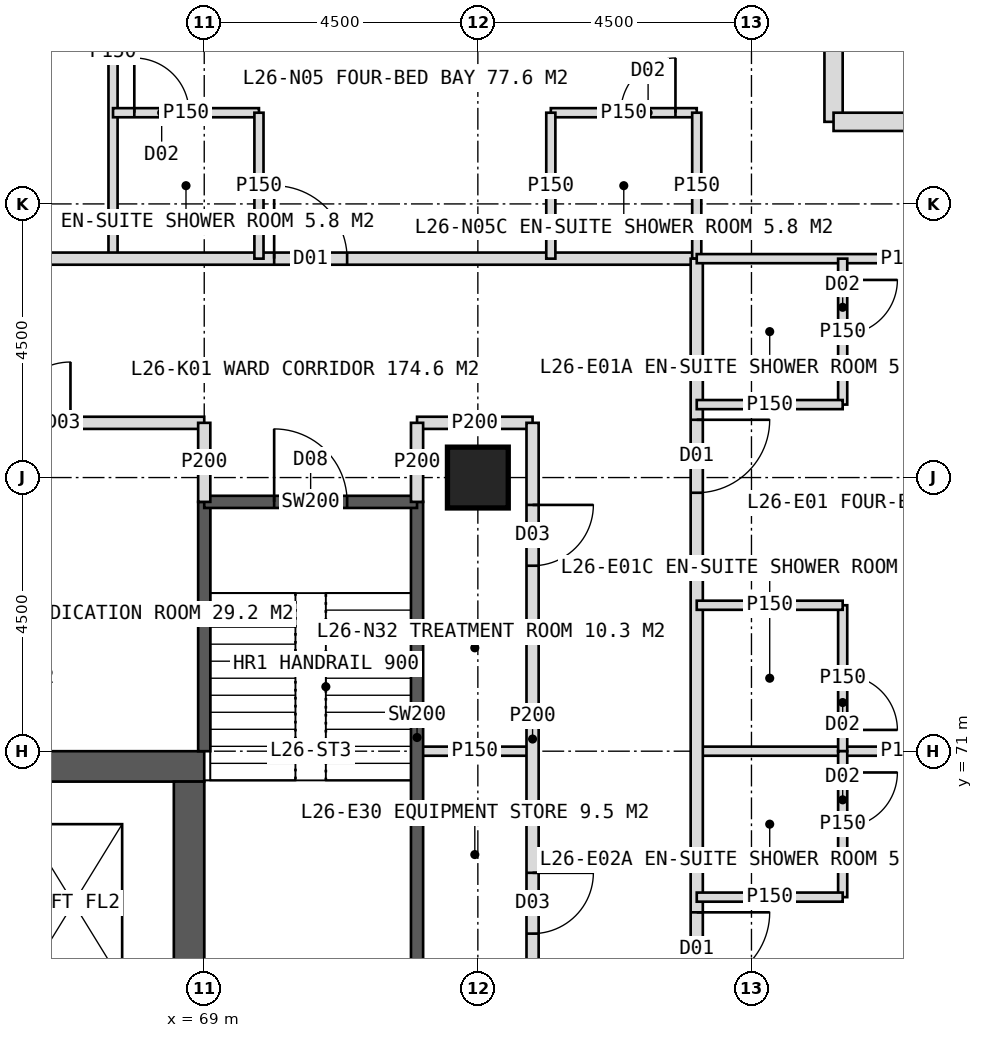
"""IFC4 building model, lengths in metres.
Left out: names, types, materials, properties, quantities, classifications, styles, units other than length and angle.
Written with IfcOpenShell. Run it as: python <this file> out.ifc"""

import sys

from ifc_helpers import new_model, si_unit, direction, frame, frame_2d, origin, origin_2d, place, context, subcontext, project, spatial, rectangle, hollow_rectangle, extrude, element, fill, save


model = new_model("IFC4")
c1 = context("Model", 3, precision=1e-05, world=origin(), true_north=direction((0.0, 1.0)))
c2 = subcontext(c1, "Body", "Model", "MODEL_VIEW")
j1 = project(units=[si_unit("LENGTHUNIT", "METRE"), si_unit("PLANEANGLEUNIT", "RADIAN")], contexts=[c1])
p1 = place(None, origin())
s1 = spatial("IfcSite", under=j1, at=p1, CompositionType="ELEMENT")
p2 = place(p1, origin())
s2 = spatial("IfcBuilding", under=s1, at=p2, CompositionType="ELEMENT")
p3 = place(p2, frame((0.0, 0.0, 112.0)))
s3 = spatial("IfcBuildingStorey", under=s2, at=p3, CompositionType="ELEMENT", Elevation=112.0)
p4 = place(p3, frame((51.0, 70.75, 0.0), z_axis=(0.0, 0.0, 1.0), x_axis=(1.0, 0.0, 0.0)))
e1 = element("IfcWall", 1, at=p4, inside=s3, PredefinedType="SHEAR", context=c2, shape_type="SweptSolid", body=[
    extrude(rectangle(XDim=18.0, YDim=0.5, at=frame_2d((9.0, 0.0))), origin(), (0.0, 0.0, 1.0), 4.0),
])
p5 = place(p4, frame((8.1, 0.0, 0.0)))
e2 = element("IfcOpeningElement", 2, at=p5, cuts=e1, PredefinedType="OPENING", context=c2, shape_type="SweptSolid", body=[
    extrude(rectangle(XDim=1.8, YDim=2.2, at=frame_2d((0.9, 1.1))), frame((0.0, 0.26, 0.0), z_axis=(0.0, -1.0, 0.0), x_axis=(1.0, 0.0, 0.0)), (0.0, 0.0, 1.0), 0.52),
])
p6 = place(p3, frame((68.75, 53.5, 0.0), z_axis=(0.0, 0.0, 1.0), x_axis=(0.0, 1.0, 0.0)))
e3 = element("IfcWall", 3, at=p6, inside=s3, PredefinedType="SHEAR", context=c2, shape_type="SweptSolid", body=[
    extrude(rectangle(XDim=17.0, YDim=0.5, at=frame_2d((8.5, 0.0))), origin(), (0.0, 0.0, 1.0), 4.0),
])
p7 = place(p6, frame((9.5, 0.0, 0.0)))
e4 = element("IfcOpeningElement", 4, at=p7, cuts=e3, PredefinedType="OPENING", context=c2, shape_type="SweptSolid", body=[
    extrude(rectangle(XDim=1.5, YDim=2.2, at=frame_2d((0.75, 1.1))), frame((0.0, 0.26, 0.0), z_axis=(0.0, -1.0, 0.0), x_axis=(1.0, 0.0, 0.0)), (0.0, 0.0, 1.0), 0.52),
])
p8 = place(p3, frame((73.5, 75.5, 0.0), z_axis=(0.0, 0.0, 1.0), x_axis=(1.0, 0.0, 0.0)))
e5 = element("IfcColumn", 5, at=p8, inside=s3, PredefinedType="COLUMN", context=c2, shape_type="SweptSolid", body=[
    extrude(hollow_rectangle(XDim=1.0, YDim=1.0, WallThickness=0.1, at=origin_2d()), origin(), (0.0, 0.0, 1.0), 4.0),
])
for number, where, z_axis, x_axis in (
    (6, (79.35, 85.15, 0.0), (0.0, 0.0, 1.0), (0.0, -1.0, 0.0)),
    (7, (79.35, 81.35, 0.0), (0.0, 0.0, 1.0), (1.0, 0.0, 0.0)),
):
    element("IfcWall", number, at=place(p3, frame(where, z_axis=z_axis, x_axis=x_axis)), inside=s3, PredefinedType="ELEMENTEDWALL", context=c2, shape_type="SweptSolid", body=[
        extrude(rectangle(XDim=3.8, YDim=0.3, at=frame_2d((1.9, 0.0))), origin(), (0.0, 0.0, 1.0), 4.0),
    ])
p9 = place(p3, frame((67.5, 79.1, 0.0), z_axis=(0.0, 0.0, 1.0), x_axis=(0.0, 1.0, 0.0)))
e8 = element("IfcWall", 8, at=p9, inside=s3, PredefinedType="PARTITIONING", context=c2, shape_type="SweptSolid", body=[
    extrude(rectangle(XDim=6.81, YDim=0.15, at=frame_2d((3.405, 0.0))), origin(), (0.0, 0.0, 1.0), 3.75),
])
p10 = place(p3, frame((42.9, 79.1, 0.0), z_axis=(0.0, 0.0, 1.0), x_axis=(1.0, 0.0, 0.0)))
e9 = element("IfcWall", 9, at=p10, inside=s3, PredefinedType="PARTITIONING", context=c2, shape_type="SweptSolid", body=[
    extrude(rectangle(XDim=34.2, YDim=0.2, at=frame_2d((17.1, 0.0))), origin(), (0.0, 0.0, 1.0), 3.75),
])
p11 = place(p10, frame((3.25, 0.0, 0.0)))
e10 = element("IfcOpeningElement", 10, at=p11, cuts=e9, PredefinedType="OPENING", context=c2, shape_type="SweptSolid", body=[
    extrude(rectangle(XDim=1.2, YDim=2.2, at=frame_2d((0.6, 1.1))), frame((0.0, 0.11, 0.0), z_axis=(0.0, -1.0, 0.0), x_axis=(1.0, 0.0, 0.0)), (0.0, 0.0, 1.0), 0.22),
])
p12 = place(p10, frame((9.25, 0.0, 0.0)))
e11 = element("IfcOpeningElement", 11, at=p12, cuts=e9, PredefinedType="OPENING", context=c2, shape_type="SweptSolid", body=[
    extrude(rectangle(XDim=1.2, YDim=2.2, at=frame_2d((0.6, 1.1))), frame((0.0, 0.11, 0.0), z_axis=(0.0, -1.0, 0.0), x_axis=(1.0, 0.0, 0.0)), (0.0, 0.0, 1.0), 0.22),
])
p13 = place(p10, frame((13.75, 0.0, 0.0)))
e12 = element("IfcOpeningElement", 12, at=p13, cuts=e9, PredefinedType="OPENING", context=c2, shape_type="SweptSolid", body=[
    extrude(rectangle(XDim=1.2, YDim=2.2, at=frame_2d((0.6, 1.1))), frame((0.0, 0.11, 0.0), z_axis=(0.0, -1.0, 0.0), x_axis=(1.0, 0.0, 0.0)), (0.0, 0.0, 1.0), 0.22),
])
p14 = place(p10, frame((19.6, 0.0, 0.0)))
e13 = element("IfcOpeningElement", 13, at=p14, cuts=e9, PredefinedType="OPENING", context=c2, shape_type="SweptSolid", body=[
    extrude(rectangle(XDim=1.0, YDim=2.1, at=frame_2d((0.5, 1.05))), frame((0.0, 0.11, 0.0), z_axis=(0.0, -1.0, 0.0), x_axis=(1.0, 0.0, 0.0)), (0.0, 0.0, 1.0), 0.22),
])
p15 = place(p10, frame((27.25, 0.0, 0.0)))
e14 = element("IfcOpeningElement", 14, at=p15, cuts=e9, PredefinedType="OPENING", context=c2, shape_type="SweptSolid", body=[
    extrude(rectangle(XDim=1.2, YDim=2.2, at=frame_2d((0.6, 1.1))), frame((0.0, 0.11, 0.0), z_axis=(0.0, -1.0, 0.0), x_axis=(1.0, 0.0, 0.0)), (0.0, 0.0, 1.0), 0.22),
])
p16 = place(p3, frame((67.5, 81.5, 0.0), z_axis=(0.0, 0.0, 1.0), x_axis=(1.0, 0.0, 0.0)))
e15 = element("IfcWall", 15, at=p16, inside=s3, PredefinedType="PARTITIONING", context=c2, shape_type="SweptSolid", body=[
    extrude(rectangle(XDim=2.4, YDim=0.15, at=frame_2d((1.2, 0.0))), origin(), (0.0, 0.0, 1.0), 3.75),
])
p17 = place(p16, frame((0.35, 0.0, 0.0)))
e16 = element("IfcOpeningElement", 16, at=p17, cuts=e15, PredefinedType="OPENING", context=c2, shape_type="SweptSolid", body=[
    extrude(rectangle(XDim=0.9, YDim=2.1, at=frame_2d((0.45, 1.05))), frame((0.0, 0.085, 0.0), z_axis=(0.0, -1.0, 0.0), x_axis=(1.0, 0.0, 0.0)), (0.0, 0.0, 1.0), 0.17),
])
p18 = place(p3, frame((69.9, 79.1, 0.0), z_axis=(0.0, 0.0, 1.0), x_axis=(0.0, 1.0, 0.0)))
e17 = element("IfcWall", 17, at=p18, inside=s3, PredefinedType="PARTITIONING", context=c2, shape_type="SweptSolid", body=[
    extrude(rectangle(XDim=2.4, YDim=0.15, at=frame_2d((1.2, 0.0))), origin(), (0.0, 0.0, 1.0), 3.75),
])
p19 = place(p3, frame((74.7, 81.5, 0.0), z_axis=(0.0, 0.0, 1.0), x_axis=(1.0, 0.0, 0.0)))
e18 = element("IfcWall", 18, at=p19, inside=s3, PredefinedType="PARTITIONING", context=c2, shape_type="SweptSolid", body=[
    extrude(rectangle(XDim=2.4, YDim=0.15, at=frame_2d((1.2, 0.0))), origin(), (0.0, 0.0, 1.0), 3.75),
])
p20 = place(p19, frame((1.15, 0.0, 0.0)))
e19 = element("IfcOpeningElement", 19, at=p20, cuts=e18, PredefinedType="OPENING", context=c2, shape_type="SweptSolid", body=[
    extrude(rectangle(XDim=0.9, YDim=2.1, at=frame_2d((0.45, 1.05))), frame((0.0, 0.085, 0.0), z_axis=(0.0, -1.0, 0.0), x_axis=(1.0, 0.0, 0.0)), (0.0, 0.0, 1.0), 0.17),
])
for number, where, z_axis, x_axis in (
    (20, (74.7, 79.1, 0.0), (0.0, 0.0, 1.0), (0.0, 1.0, 0.0)),
    (21, (77.1, 79.1, 0.0), (0.0, 0.0, 1.0), (0.0, 1.0, 0.0)),
):
    element("IfcWall", number, at=place(p3, frame(where, z_axis=z_axis, x_axis=x_axis)), inside=s3, PredefinedType="PARTITIONING", context=c2, shape_type="SweptSolid", body=[
        extrude(rectangle(XDim=2.4, YDim=0.15, at=frame_2d((1.2, 0.0))), origin(), (0.0, 0.0, 1.0), 3.75),
    ])
p21 = place(p3, frame((62.25, 76.4, 0.0), z_axis=(0.0, 0.0, 1.0), x_axis=(1.0, 0.0, 0.0)))
e22 = element("IfcWall", 22, at=p21, inside=s3, PredefinedType="PARTITIONING", context=c2, shape_type="SweptSolid", body=[
    extrude(rectangle(XDim=6.75, YDim=0.2, at=frame_2d((3.375, 0.0))), origin(), (0.0, 0.0, 1.0), 3.75),
])
p22 = place(p21, frame((3.55, 0.0, 0.0)))
e23 = element("IfcOpeningElement", 23, at=p22, cuts=e22, PredefinedType="OPENING", context=c2, shape_type="SweptSolid", body=[
    extrude(rectangle(XDim=1.0, YDim=2.1, at=frame_2d((0.5, 1.05))), frame((0.0, 0.11, 0.0), z_axis=(0.0, -1.0, 0.0), x_axis=(1.0, 0.0, 0.0)), (0.0, 0.0, 1.0), 0.22),
])
p23 = place(p3, frame((72.5, 76.4, 0.0), z_axis=(0.0, 0.0, 1.0), x_axis=(1.0, 0.0, 0.0)))
e24 = element("IfcWall", 24, at=p23, inside=s3, PredefinedType="PARTITIONING", context=c2, shape_type="SweptSolid", body=[
    extrude(rectangle(XDim=1.9, YDim=0.2, at=frame_2d((0.95, 0.0))), origin(), (0.0, 0.0, 1.0), 3.75),
])
p24 = place(p3, frame((77.1, 71.0, 0.0), z_axis=(0.0, 0.0, 1.0), x_axis=(1.0, 0.0, 0.0)))
e25 = element("IfcWall", 25, at=p24, inside=s3, PredefinedType="PARTITIONING", context=c2, shape_type="SweptSolid", body=[
    extrude(rectangle(XDim=6.81, YDim=0.15, at=frame_2d((3.405, 0.0))), origin(), (0.0, 0.0, 1.0), 3.75),
])
p25 = place(p3, frame((77.1, 79.1, 0.0), z_axis=(0.0, 0.0, 1.0), x_axis=(0.0, -1.0, 0.0)))
e26 = element("IfcWall", 26, at=p25, inside=s3, PredefinedType="PARTITIONING", context=c2, shape_type="SweptSolid", body=[
    extrude(rectangle(XDim=34.2, YDim=0.2, at=frame_2d((17.1, 0.0))), origin(), (0.0, 0.0, 1.0), 3.75),
])
p26 = place(p25, frame((2.65, 0.0, 0.0)))
e27 = element("IfcOpeningElement", 27, at=p26, cuts=e26, PredefinedType="OPENING", context=c2, shape_type="SweptSolid", body=[
    extrude(rectangle(XDim=1.2, YDim=2.2, at=frame_2d((0.6, 1.1))), frame((0.0, 0.11, 0.0), z_axis=(0.0, -1.0, 0.0), x_axis=(1.0, 0.0, 0.0)), (0.0, 0.0, 1.0), 0.22),
])
p27 = place(p25, frame((10.75, 0.0, 0.0)))
e28 = element("IfcOpeningElement", 28, at=p27, cuts=e26, PredefinedType="OPENING", context=c2, shape_type="SweptSolid", body=[
    extrude(rectangle(XDim=1.2, YDim=2.2, at=frame_2d((0.6, 1.1))), frame((0.0, 0.11, 0.0), z_axis=(0.0, -1.0, 0.0), x_axis=(1.0, 0.0, 0.0)), (0.0, 0.0, 1.0), 0.22),
])
p28 = place(p25, frame((19.75, 0.0, 0.0)))
e29 = element("IfcOpeningElement", 29, at=p28, cuts=e26, PredefinedType="OPENING", context=c2, shape_type="SweptSolid", body=[
    extrude(rectangle(XDim=1.2, YDim=2.2, at=frame_2d((0.6, 1.1))), frame((0.0, 0.11, 0.0), z_axis=(0.0, -1.0, 0.0), x_axis=(1.0, 0.0, 0.0)), (0.0, 0.0, 1.0), 0.22),
])
p29 = place(p25, frame((25.75, 0.0, 0.0)))
e30 = element("IfcOpeningElement", 30, at=p29, cuts=e26, PredefinedType="OPENING", context=c2, shape_type="SweptSolid", body=[
    extrude(rectangle(XDim=1.2, YDim=2.2, at=frame_2d((0.6, 1.1))), frame((0.0, 0.11, 0.0), z_axis=(0.0, -1.0, 0.0), x_axis=(1.0, 0.0, 0.0)), (0.0, 0.0, 1.0), 0.22),
])
p30 = place(p25, frame((30.25, 0.0, 0.0)))
e31 = element("IfcOpeningElement", 31, at=p30, cuts=e26, PredefinedType="OPENING", context=c2, shape_type="SweptSolid", body=[
    extrude(rectangle(XDim=1.2, YDim=2.2, at=frame_2d((0.6, 1.1))), frame((0.0, 0.11, 0.0), z_axis=(0.0, -1.0, 0.0), x_axis=(1.0, 0.0, 0.0)), (0.0, 0.0, 1.0), 0.22),
])
p31 = place(p3, frame((77.1, 79.1, 0.0), z_axis=(0.0, 0.0, 1.0), x_axis=(1.0, 0.0, 0.0)))
e32 = element("IfcWall", 32, at=p31, inside=s3, PredefinedType="PARTITIONING", context=c2, shape_type="SweptSolid", body=[
    extrude(rectangle(XDim=6.81, YDim=0.15, at=frame_2d((3.405, 0.0))), origin(), (0.0, 0.0, 1.0), 3.75),
])
p32 = place(p3, frame((79.5, 79.1, 0.0), z_axis=(0.0, 0.0, 1.0), x_axis=(0.0, -1.0, 0.0)))
e33 = element("IfcWall", 33, at=p32, inside=s3, PredefinedType="PARTITIONING", context=c2, shape_type="SweptSolid", body=[
    extrude(rectangle(XDim=2.4, YDim=0.15, at=frame_2d((1.2, 0.0))), origin(), (0.0, 0.0, 1.0), 3.75),
])
p33 = place(p32, frame((0.35, 0.0, 0.0)))
e34 = element("IfcOpeningElement", 34, at=p33, cuts=e33, PredefinedType="OPENING", context=c2, shape_type="SweptSolid", body=[
    extrude(rectangle(XDim=0.9, YDim=2.1, at=frame_2d((0.45, 1.05))), frame((0.0, 0.085, 0.0), z_axis=(0.0, -1.0, 0.0), x_axis=(1.0, 0.0, 0.0)), (0.0, 0.0, 1.0), 0.17),
])
p34 = place(p3, frame((77.1, 76.7, 0.0), z_axis=(0.0, 0.0, 1.0), x_axis=(1.0, 0.0, 0.0)))
e35 = element("IfcWall", 35, at=p34, inside=s3, PredefinedType="PARTITIONING", context=c2, shape_type="SweptSolid", body=[
    extrude(rectangle(XDim=2.4, YDim=0.15, at=frame_2d((1.2, 0.0))), origin(), (0.0, 0.0, 1.0), 3.75),
])
p35 = place(p3, frame((79.5, 73.4, 0.0), z_axis=(0.0, 0.0, 1.0), x_axis=(0.0, -1.0, 0.0)))
e36 = element("IfcWall", 36, at=p35, inside=s3, PredefinedType="PARTITIONING", context=c2, shape_type="SweptSolid", body=[
    extrude(rectangle(XDim=2.4, YDim=0.15, at=frame_2d((1.2, 0.0))), origin(), (0.0, 0.0, 1.0), 3.75),
])
p36 = place(p35, frame((1.15, 0.0, 0.0)))
e37 = element("IfcOpeningElement", 37, at=p36, cuts=e36, PredefinedType="OPENING", context=c2, shape_type="SweptSolid", body=[
    extrude(rectangle(XDim=0.9, YDim=2.1, at=frame_2d((0.45, 1.05))), frame((0.0, 0.085, 0.0), z_axis=(0.0, -1.0, 0.0), x_axis=(1.0, 0.0, 0.0)), (0.0, 0.0, 1.0), 0.17),
])
p37 = place(p3, frame((77.1, 73.4, 0.0), z_axis=(0.0, 0.0, 1.0), x_axis=(1.0, 0.0, 0.0)))
e38 = element("IfcWall", 38, at=p37, inside=s3, PredefinedType="PARTITIONING", context=c2, shape_type="SweptSolid", body=[
    extrude(rectangle(XDim=2.4, YDim=0.15, at=frame_2d((1.2, 0.0))), origin(), (0.0, 0.0, 1.0), 3.75),
])
p38 = place(p3, frame((79.5, 71.0, 0.0), z_axis=(0.0, 0.0, 1.0), x_axis=(0.0, -1.0, 0.0)))
e39 = element("IfcWall", 39, at=p38, inside=s3, PredefinedType="PARTITIONING", context=c2, shape_type="SweptSolid", body=[
    extrude(rectangle(XDim=2.4, YDim=0.15, at=frame_2d((1.2, 0.0))), origin(), (0.0, 0.0, 1.0), 3.75),
])
p39 = place(p38, frame((0.35, 0.0, 0.0)))
e40 = element("IfcOpeningElement", 40, at=p39, cuts=e39, PredefinedType="OPENING", context=c2, shape_type="SweptSolid", body=[
    extrude(rectangle(XDim=0.9, YDim=2.1, at=frame_2d((0.45, 1.05))), frame((0.0, 0.085, 0.0), z_axis=(0.0, -1.0, 0.0), x_axis=(1.0, 0.0, 0.0)), (0.0, 0.0, 1.0), 0.17),
])
p40 = place(p3, frame((77.1, 68.6, 0.0), z_axis=(0.0, 0.0, 1.0), x_axis=(1.0, 0.0, 0.0)))
e41 = element("IfcWall", 41, at=p40, inside=s3, PredefinedType="PARTITIONING", context=c2, shape_type="SweptSolid", body=[
    extrude(rectangle(XDim=2.4, YDim=0.15, at=frame_2d((1.2, 0.0))), origin(), (0.0, 0.0, 1.0), 3.75),
])
p41 = place(p3, frame((72.5, 71.0, 0.0), z_axis=(0.0, 0.0, 1.0), x_axis=(1.0, 0.0, 0.0)))
e42 = element("IfcWall", 42, at=p41, inside=s3, PredefinedType="PARTITIONING", context=c2, shape_type="SweptSolid", body=[
    extrude(rectangle(XDim=1.9, YDim=0.15, at=frame_2d((0.95, 0.0))), origin(), (0.0, 0.0, 1.0), 3.75),
])
p42 = place(p3, frame((74.4, 76.4, 0.0), z_axis=(0.0, 0.0, 1.0), x_axis=(0.0, -1.0, 0.0)))
e43 = element("IfcWall", 43, at=p42, inside=s3, PredefinedType="PARTITIONING", context=c2, shape_type="SweptSolid", body=[
    extrude(rectangle(XDim=10.4, YDim=0.2, at=frame_2d((5.2, 0.0))), origin(), (0.0, 0.0, 1.0), 3.75),
])
p43 = place(p42, frame((1.35, 0.0, 0.0)))
e44 = element("IfcOpeningElement", 44, at=p43, cuts=e43, PredefinedType="OPENING", context=c2, shape_type="SweptSolid", body=[
    extrude(rectangle(XDim=1.0, YDim=2.1, at=frame_2d((0.5, 1.05))), frame((0.0, 0.11, 0.0), z_axis=(0.0, -1.0, 0.0), x_axis=(1.0, 0.0, 0.0)), (0.0, 0.0, 1.0), 0.22),
])
p44 = place(p42, frame((7.4, 0.0, 0.0)))
e45 = element("IfcOpeningElement", 45, at=p44, cuts=e43, PredefinedType="OPENING", context=c2, shape_type="SweptSolid", body=[
    extrude(rectangle(XDim=1.0, YDim=2.1, at=frame_2d((0.5, 1.05))), frame((0.0, 0.11, 0.0), z_axis=(0.0, -1.0, 0.0), x_axis=(1.0, 0.0, 0.0)), (0.0, 0.0, 1.0), 0.22),
])
p45 = place(p3, frame((69.0, 71.0, 0.0), z_axis=(0.0, 0.0, 1.0), x_axis=(0.0, 1.0, 0.0)))
e46 = element("IfcWall", 46, at=p45, inside=s3, PredefinedType="SOLIDWALL", context=c2, shape_type="SweptSolid", body=[
    extrude(rectangle(XDim=4.1, YDim=0.2, at=frame_2d((2.05, 0.0))), origin(), (0.0, 0.0, 1.0), 3.75),
])
p46 = place(p3, frame((72.5, 67.35, 0.0), z_axis=(0.0, 0.0, 1.0), x_axis=(0.0, 1.0, 0.0)))
e47 = element("IfcWall", 47, at=p46, inside=s3, PredefinedType="SOLIDWALL", context=c2, shape_type="SweptSolid", body=[
    extrude(rectangle(XDim=7.75, YDim=0.2, at=frame_2d((3.875, 0.0))), origin(), (0.0, 0.0, 1.0), 3.75),
])
p47 = place(p3, frame((69.0, 75.1, 0.0), z_axis=(0.0, 0.0, 1.0), x_axis=(1.0, 0.0, 0.0)))
e48 = element("IfcWall", 48, at=p47, inside=s3, PredefinedType="SOLIDWALL", context=c2, shape_type="SweptSolid", body=[
    extrude(rectangle(XDim=3.5, YDim=0.2, at=frame_2d((1.75, 0.0))), origin(), (0.0, 0.0, 1.0), 3.75),
])
p48 = place(p47, frame((1.15, 0.0, 0.0)))
e49 = element("IfcOpeningElement", 49, at=p48, cuts=e48, PredefinedType="OPENING", context=c2, shape_type="SweptSolid", body=[
    extrude(rectangle(XDim=1.2, YDim=2.1, at=frame_2d((0.6, 1.05))), frame((0.0, 0.11, 0.0), z_axis=(0.0, -1.0, 0.0), x_axis=(1.0, 0.0, 0.0)), (0.0, 0.0, 1.0), 0.22),
])
for number, where, z_axis, x_axis in (
    (50, (69.0, 75.1, 0.0), (0.0, 0.0, 1.0), (0.0, 1.0, 0.0)),
    (51, (72.5, 75.1, 0.0), (0.0, 0.0, 1.0), (0.0, 1.0, 0.0)),
):
    element("IfcWall", number, at=place(p3, frame(where, z_axis=z_axis, x_axis=x_axis)), inside=s3, PredefinedType="PARTITIONING", context=c2, shape_type="SweptSolid", body=[
        extrude(rectangle(XDim=1.3, YDim=0.2, at=frame_2d((0.65, 0.0))), origin(), (0.0, 0.0, 1.0), 3.75),
    ])
p49 = place(p15, origin())
e52 = element("IfcDoor", 52, at=p49, inside=s3, OperationType="SINGLE_SWING_LEFT", PredefinedType="DOOR", context=c2, shape_type="SweptSolid", body=[
    extrude(rectangle(XDim=1.2, YDim=2.2, at=frame_2d((0.6, 1.1))), frame((0.0, 0.025, 0.0), z_axis=(0.0, -1.0, 0.0), x_axis=(1.0, 0.0, 0.0)), (0.0, 0.0, 1.0), 0.05),
])
fill(e14, e52)
p50 = place(p17, origin())
e53 = element("IfcDoor", 53, at=p50, inside=s3, OperationType="SINGLE_SWING_LEFT", PredefinedType="DOOR", context=c2, shape_type="SweptSolid", body=[
    extrude(rectangle(XDim=0.9, YDim=2.1, at=frame_2d((0.45, 1.05))), frame((0.0, 0.025, 0.0), z_axis=(0.0, -1.0, 0.0), x_axis=(1.0, 0.0, 0.0)), (0.0, 0.0, 1.0), 0.05),
])
fill(e16, e53)
p51 = place(p20, origin())
e54 = element("IfcDoor", 54, at=p51, inside=s3, OperationType="SINGLE_SWING_RIGHT", PredefinedType="DOOR", context=c2, shape_type="SweptSolid", body=[
    extrude(rectangle(XDim=0.9, YDim=2.1, at=frame_2d((0.45, 1.05))), frame((0.0, 0.025, 0.0), z_axis=(0.0, -1.0, 0.0), x_axis=(1.0, 0.0, 0.0)), (0.0, 0.0, 1.0), 0.05),
])
fill(e19, e54)
p52 = place(p22, origin())
e55 = element("IfcDoor", 55, at=p52, inside=s3, OperationType="SINGLE_SWING_RIGHT", PredefinedType="DOOR", context=c2, shape_type="SweptSolid", body=[
    extrude(rectangle(XDim=1.0, YDim=2.1, at=frame_2d((0.5, 1.05))), frame((0.0, 0.025, 0.0), z_axis=(0.0, -1.0, 0.0), x_axis=(1.0, 0.0, 0.0)), (0.0, 0.0, 1.0), 0.05),
])
fill(e23, e55)
p53 = place(p43, origin())
e56 = element("IfcDoor", 56, at=p53, inside=s3, OperationType="SINGLE_SWING_LEFT", PredefinedType="DOOR", context=c2, shape_type="SweptSolid", body=[
    extrude(rectangle(XDim=1.0, YDim=2.1, at=frame_2d((0.5, 1.05))), frame((0.0, 0.025, 0.0), z_axis=(0.0, -1.0, 0.0), x_axis=(1.0, 0.0, 0.0)), (0.0, 0.0, 1.0), 0.05),
])
fill(e44, e56)
p54 = place(p26, origin())
e57 = element("IfcDoor", 57, at=p54, inside=s3, OperationType="SINGLE_SWING_LEFT", PredefinedType="DOOR", context=c2, shape_type="SweptSolid", body=[
    extrude(rectangle(XDim=1.2, YDim=2.2, at=frame_2d((0.6, 1.1))), frame((0.0, 0.025, 0.0), z_axis=(0.0, -1.0, 0.0), x_axis=(1.0, 0.0, 0.0)), (0.0, 0.0, 1.0), 0.05),
])
fill(e27, e57)
p55 = place(p33, origin())
e58 = element("IfcDoor", 58, at=p55, inside=s3, OperationType="SINGLE_SWING_LEFT", PredefinedType="DOOR", context=c2, shape_type="SweptSolid", body=[
    extrude(rectangle(XDim=0.9, YDim=2.1, at=frame_2d((0.45, 1.05))), frame((0.0, 0.025, 0.0), z_axis=(0.0, -1.0, 0.0), x_axis=(1.0, 0.0, 0.0)), (0.0, 0.0, 1.0), 0.05),
])
fill(e34, e58)
p56 = place(p36, origin())
e59 = element("IfcDoor", 59, at=p56, inside=s3, OperationType="SINGLE_SWING_RIGHT", PredefinedType="DOOR", context=c2, shape_type="SweptSolid", body=[
    extrude(rectangle(XDim=0.9, YDim=2.1, at=frame_2d((0.45, 1.05))), frame((0.0, 0.025, 0.0), z_axis=(0.0, -1.0, 0.0), x_axis=(1.0, 0.0, 0.0)), (0.0, 0.0, 1.0), 0.05),
])
fill(e37, e59)
p57 = place(p27, origin())
e60 = element("IfcDoor", 60, at=p57, inside=s3, OperationType="SINGLE_SWING_LEFT", PredefinedType="DOOR", context=c2, shape_type="SweptSolid", body=[
    extrude(rectangle(XDim=1.2, YDim=2.2, at=frame_2d((0.6, 1.1))), frame((0.0, 0.025, 0.0), z_axis=(0.0, -1.0, 0.0), x_axis=(1.0, 0.0, 0.0)), (0.0, 0.0, 1.0), 0.05),
])
fill(e28, e60)
p58 = place(p39, origin())
e61 = element("IfcDoor", 61, at=p58, inside=s3, OperationType="SINGLE_SWING_LEFT", PredefinedType="DOOR", context=c2, shape_type="SweptSolid", body=[
    extrude(rectangle(XDim=0.9, YDim=2.1, at=frame_2d((0.45, 1.05))), frame((0.0, 0.025, 0.0), z_axis=(0.0, -1.0, 0.0), x_axis=(1.0, 0.0, 0.0)), (0.0, 0.0, 1.0), 0.05),
])
fill(e40, e61)
p59 = place(p44, origin())
e62 = element("IfcDoor", 62, at=p59, inside=s3, OperationType="SINGLE_SWING_LEFT", PredefinedType="DOOR", context=c2, shape_type="SweptSolid", body=[
    extrude(rectangle(XDim=1.0, YDim=2.1, at=frame_2d((0.5, 1.05))), frame((0.0, 0.025, 0.0), z_axis=(0.0, -1.0, 0.0), x_axis=(1.0, 0.0, 0.0)), (0.0, 0.0, 1.0), 0.05),
])
fill(e45, e62)
p60 = place(p48, origin())
e63 = element("IfcDoor", 63, at=p60, inside=s3, OperationType="SINGLE_SWING_LEFT", PredefinedType="DOOR", context=c2, shape_type="SweptSolid", body=[
    extrude(rectangle(XDim=1.2, YDim=2.1, at=frame_2d((0.6, 1.05))), frame((0.0, 0.025, 0.0), z_axis=(0.0, -1.0, 0.0), x_axis=(1.0, 0.0, 0.0)), (0.0, 0.0, 1.0), 0.05),
])
fill(e49, e63)
save(model, sys.argv[1])
